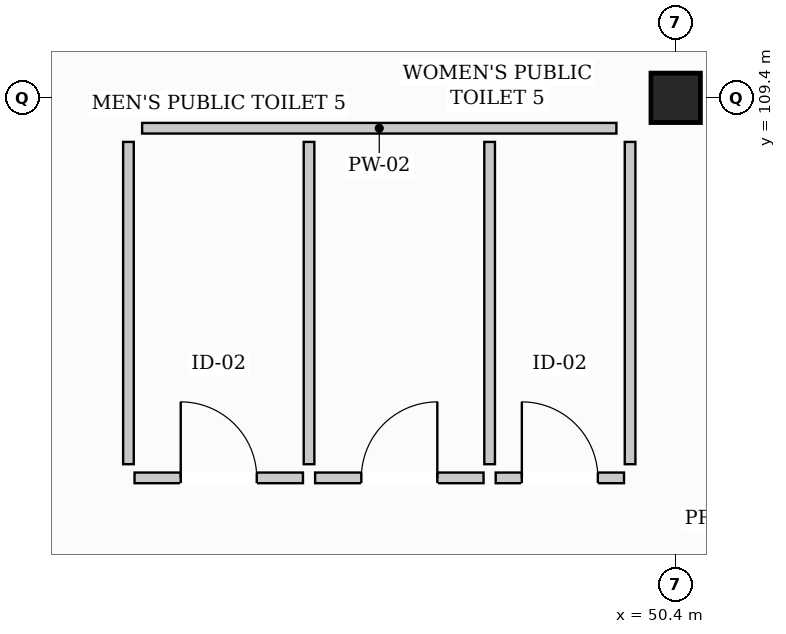
"""IFC4 building model, lengths in metres.
Left out: names, types, materials, properties, quantities, classifications, styles, units other than length and angle.
Written with IfcOpenShell. Run it as: python <this file> out.ifc"""

import sys

from ifc_helpers import new_model, si_unit, direction, frame, frame_2d, origin, origin_2d, place, context, subcontext, project, spatial, rectangle, extrude, element, fill, save


model = new_model("IFC4")
c1 = context("Model", 3, precision=1e-05, world=origin(), true_north=direction((0.0, 1.0)))
c2 = subcontext(c1, "Body", "Model", "MODEL_VIEW")
j1 = project(units=[si_unit("LENGTHUNIT", "METRE"), si_unit("PLANEANGLEUNIT", "RADIAN")], contexts=[c1])
p1 = place(None, origin())
s1 = spatial("IfcSite", under=j1, at=p1, CompositionType="ELEMENT")
p2 = place(p1, origin())
s2 = spatial("IfcBuilding", under=s1, at=p2, CompositionType="ELEMENT")
p3 = place(p2, frame((0.0, 0.0, 5.1)))
s3 = spatial("IfcBuildingStorey", under=s2, at=p3, CompositionType="ELEMENT", Elevation=5.1)
p4 = place(p3, frame((50.4, 109.4, 0.0), z_axis=(0.0, 0.0, 1.0), x_axis=(1.0, 0.0, 0.0)))
e1 = element("IfcColumn", 1, at=p4, inside=s3, PredefinedType="COLUMN", context=c2, shape_type="SweptSolid", body=[
    extrude(rectangle(XDim=0.65, YDim=0.65, at=origin_2d()), origin(), (0.0, 0.0, 1.0), 4.5),
])
p5 = place(p3, frame((43.38, 109.0, 0.0), z_axis=(0.0, 0.0, 1.0), x_axis=(1.0, 0.0, 0.0)))
e2 = element("IfcWall", 2, at=p5, inside=s3, PredefinedType="PARTITIONING", context=c2, shape_type="SweptSolid", body=[
    extrude(rectangle(XDim=6.24, YDim=0.14, at=frame_2d((3.12, 0.0))), origin(), (0.0, 0.0, 1.0), 4.0),
])
for number, where, z_axis, x_axis in (
    (3, (43.2, 104.58, 0.0), (0.0, 0.0, 1.0), (0.0, 1.0, 0.0)),
    (4, (49.8, 104.58, 0.0), (0.0, 0.0, 1.0), (0.0, 1.0, 0.0)),
    (5, (45.576, 104.58, 0.0), (0.0, 0.0, 1.0), (0.0, 1.0, 0.0)),
    (6, (47.952, 104.58, 0.0), (0.0, 0.0, 1.0), (0.0, 1.0, 0.0)),
):
    element("IfcWall", number, at=place(p3, frame(where, z_axis=z_axis, x_axis=x_axis)), inside=s3, PredefinedType="PARTITIONING", context=c2, shape_type="SweptSolid", body=[
        extrude(rectangle(XDim=4.24, YDim=0.14, at=frame_2d((2.12, 0.0))), origin(), (0.0, 0.0, 1.0), 4.22),
    ])
p6 = place(p3, frame((43.28, 104.4, 0.0), z_axis=(0.0, 0.0, 1.0), x_axis=(1.0, 0.0, 0.0)))
e7 = element("IfcWall", 7, at=p6, inside=s3, PredefinedType="PARTITIONING", context=c2, shape_type="SweptSolid", body=[
    extrude(rectangle(XDim=2.216, YDim=0.14, at=frame_2d((1.108, 0.0))), origin(), (0.0, 0.0, 1.0), 4.22),
])
p7 = place(p6, frame((0.608, 0.0, 0.0)))
e8 = element("IfcOpeningElement", 8, at=p7, cuts=e7, PredefinedType="OPENING", context=c2, shape_type="SweptSolid", body=[
    extrude(rectangle(XDim=1.0, YDim=2.15, at=frame_2d((0.5, 1.075))), frame((0.0, 0.08, 0.0), z_axis=(0.0, -1.0, 0.0), x_axis=(1.0, 0.0, 0.0)), (0.0, 0.0, 1.0), 0.16),
])
p8 = place(p3, frame((45.656, 104.4, 0.0), z_axis=(0.0, 0.0, 1.0), x_axis=(1.0, 0.0, 0.0)))
e9 = element("IfcWall", 9, at=p8, inside=s3, PredefinedType="PARTITIONING", context=c2, shape_type="SweptSolid", body=[
    extrude(rectangle(XDim=2.216, YDim=0.14, at=frame_2d((1.108, 0.0))), origin(), (0.0, 0.0, 1.0), 4.0),
])
p9 = place(p8, frame((0.608, 0.0, 0.0)))
e10 = element("IfcOpeningElement", 10, at=p9, cuts=e9, PredefinedType="OPENING", context=c2, shape_type="SweptSolid", body=[
    extrude(rectangle(XDim=1.0, YDim=2.15, at=frame_2d((0.5, 1.075))), frame((0.0, 0.08, 0.0), z_axis=(0.0, -1.0, 0.0), x_axis=(1.0, 0.0, 0.0)), (0.0, 0.0, 1.0), 0.16),
])
p10 = place(p3, frame((48.032, 104.4, 0.0), z_axis=(0.0, 0.0, 1.0), x_axis=(1.0, 0.0, 0.0)))
e11 = element("IfcWall", 11, at=p10, inside=s3, PredefinedType="PARTITIONING", context=c2, shape_type="SweptSolid", body=[
    extrude(rectangle(XDim=1.688, YDim=0.14, at=frame_2d((0.844, 0.0))), origin(), (0.0, 0.0, 1.0), 4.22),
])
p11 = place(p10, frame((0.344, 0.0, 0.0)))
e12 = element("IfcOpeningElement", 12, at=p11, cuts=e11, PredefinedType="OPENING", context=c2, shape_type="SweptSolid", body=[
    extrude(rectangle(XDim=1.0, YDim=2.15, at=frame_2d((0.5, 1.075))), frame((0.0, 0.08, 0.0), z_axis=(0.0, -1.0, 0.0), x_axis=(1.0, 0.0, 0.0)), (0.0, 0.0, 1.0), 0.16),
])
p12 = place(p7, origin())
e13 = element("IfcDoor", 13, at=p12, inside=s3, OperationType="SINGLE_SWING_LEFT", PredefinedType="DOOR", context=c2, shape_type="SweptSolid", body=[
    extrude(rectangle(XDim=1.0, YDim=2.15, at=frame_2d((0.5, 1.075))), frame((0.0, 0.025, 0.0), z_axis=(0.0, -1.0, 0.0), x_axis=(1.0, 0.0, 0.0)), (0.0, 0.0, 1.0), 0.05),
])
fill(e8, e13)
p13 = place(p9, origin())
e14 = element("IfcDoor", 14, at=p13, inside=s3, OperationType="SINGLE_SWING_RIGHT", PredefinedType="DOOR", context=c2, shape_type="SweptSolid", body=[
    extrude(rectangle(XDim=1.0, YDim=2.15, at=frame_2d((0.5, 1.075))), frame((0.0, 0.025, 0.0), z_axis=(0.0, -1.0, 0.0), x_axis=(1.0, 0.0, 0.0)), (0.0, 0.0, 1.0), 0.05),
])
fill(e10, e14)
p14 = place(p11, origin())
e15 = element("IfcDoor", 15, at=p14, inside=s3, OperationType="SINGLE_SWING_LEFT", PredefinedType="DOOR", context=c2, shape_type="SweptSolid", body=[
    extrude(rectangle(XDim=1.0, YDim=2.15, at=frame_2d((0.5, 1.075))), frame((0.0, 0.025, 0.0), z_axis=(0.0, -1.0, 0.0), x_axis=(1.0, 0.0, 0.0)), (0.0, 0.0, 1.0), 0.05),
])
fill(e12, e15)
save(model, sys.argv[1])
